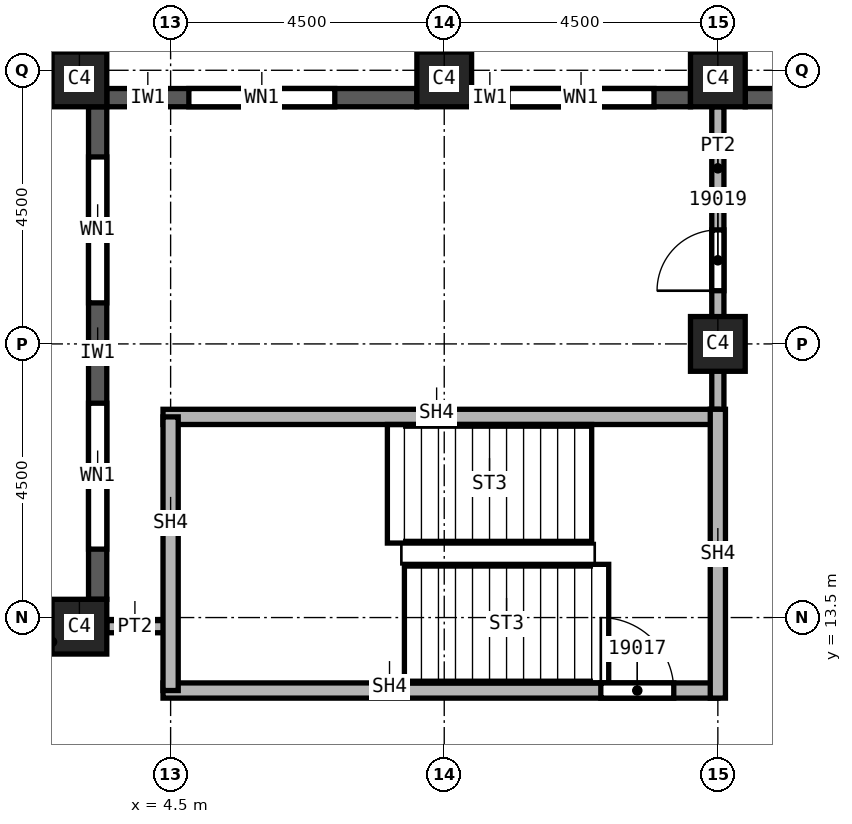
"""IFC4 building model, lengths in metres.
Left out: names, types, materials, properties, quantities, classifications, styles, units other than length and angle.
Written with IfcOpenShell. Run it as: python <this file> out.ifc"""

import sys

from ifc_helpers import new_model, si_unit, direction, frame, frame_2d, origin, origin_2d, place, context, subcontext, project, spatial, rectangle, extrude, element, fill, save


model = new_model("IFC4")
c1 = context("Model", 3, precision=1e-05, world=origin(), true_north=direction((0.0, 1.0)))
c2 = subcontext(c1, "Body", "Model", "MODEL_VIEW")
j1 = project(units=[si_unit("LENGTHUNIT", "METRE"), si_unit("PLANEANGLEUNIT", "RADIAN")], contexts=[c1])
p1 = place(None, origin())
s1 = spatial("IfcSite", under=j1, at=p1, CompositionType="ELEMENT")
p2 = place(p1, origin())
s2 = spatial("IfcBuilding", under=s1, at=p2, CompositionType="ELEMENT")
p3 = place(p2, frame((0.0, 0.0, 278.0)))
s3 = spatial("IfcBuildingStorey", under=s2, at=p3, CompositionType="ELEMENT", Elevation=278.0)
for number, where, z_axis, x_axis in (
    (1, (13.5, 18.0, 0.0), (0.0, 0.0, 1.0), (1.0, 0.0, 0.0)),
    (2, (3.0, 22.35, 0.0), (0.0, 0.0, 1.0), (1.0, 0.0, 0.0)),
    (3, (9.0, 22.35, 0.0), (0.0, 0.0, 1.0), (1.0, 0.0, 0.0)),
    (4, (13.5, 22.35, 0.0), (0.0, 0.0, 1.0), (1.0, 0.0, 0.0)),
    (5, (3.0, 13.35, 0.0), (0.0, 0.0, 1.0), (1.0, 0.0, 0.0)),
):
    element("IfcColumn", number, at=place(p3, frame(where, z_axis=z_axis, x_axis=x_axis)), inside=s3, PredefinedType="COLUMN", context=c2, shape_type="SweptSolid", body=[
        extrude(rectangle(XDim=0.9, YDim=0.9, at=origin_2d()), origin(), (0.0, 0.0, 1.0), 3.72),
    ])
p4 = place(p3, frame((17.55, 22.05, 0.0), z_axis=(0.0, 0.0, 1.0), x_axis=(-1.0, 0.0, 0.0)))
e6 = element("IfcWall", 6, at=p4, inside=s3, PredefinedType="SOLIDWALL", context=c2, shape_type="SweptSolid", body=[
    extrude(rectangle(XDim=3.6, YDim=0.3, at=frame_2d((1.8, 0.0))), origin(), (0.0, 0.0, 1.0), 3.12),
])
p5 = place(p4, frame((0.775, 0.0, 0.8)))
e7 = element("IfcOpeningElement", 7, at=p5, cuts=e6, PredefinedType="OPENING", context=c2, shape_type="SweptSolid", body=[
    extrude(rectangle(XDim=1.0, YDim=1.95, at=frame_2d((0.5, 0.975))), frame((0.0, 0.15, 0.0), z_axis=(0.0, -1.0, 0.0), x_axis=(1.0, 0.0, 0.0)), (0.0, 0.0, 1.0), 0.3),
])
p6 = place(p4, frame((2.375, 0.0, 0.8)))
e8 = element("IfcOpeningElement", 8, at=p6, cuts=e6, PredefinedType="OPENING", context=c2, shape_type="SweptSolid", body=[
    extrude(rectangle(XDim=0.6, YDim=1.95, at=frame_2d((0.3, 0.975))), frame((0.0, 0.15, 0.0), z_axis=(0.0, -1.0, 0.0), x_axis=(1.0, 0.0, 0.0)), (0.0, 0.0, 1.0), 0.3),
])
p7 = place(p3, frame((13.05, 22.05, 0.0), z_axis=(0.0, 0.0, 1.0), x_axis=(-1.0, 0.0, 0.0)))
e9 = element("IfcWall", 9, at=p7, inside=s3, PredefinedType="SOLIDWALL", context=c2, shape_type="SweptSolid", body=[
    extrude(rectangle(XDim=3.6, YDim=0.3, at=frame_2d((1.8, 0.0))), origin(), (0.0, 0.0, 1.0), 3.12),
])
p8 = place(p7, frame((0.6, 0.0, 0.8)))
e10 = element("IfcOpeningElement", 10, at=p8, cuts=e9, PredefinedType="OPENING", context=c2, shape_type="SweptSolid", body=[
    extrude(rectangle(XDim=2.4, YDim=1.95, at=frame_2d((1.2, 0.975))), frame((0.0, 0.15, 0.0), z_axis=(0.0, -1.0, 0.0), x_axis=(1.0, 0.0, 0.0)), (0.0, 0.0, 1.0), 0.3),
])
p9 = place(p3, frame((8.55, 22.05, 0.0), z_axis=(0.0, 0.0, 1.0), x_axis=(-1.0, 0.0, 0.0)))
e11 = element("IfcWall", 11, at=p9, inside=s3, PredefinedType="SOLIDWALL", context=c2, shape_type="SweptSolid", body=[
    extrude(rectangle(XDim=5.1, YDim=0.3, at=frame_2d((2.55, 0.0))), origin(), (0.0, 0.0, 1.0), 3.12),
])
p10 = place(p9, frame((1.35, 0.0, 0.8)))
e12 = element("IfcOpeningElement", 12, at=p10, cuts=e11, PredefinedType="OPENING", context=c2, shape_type="SweptSolid", body=[
    extrude(rectangle(XDim=2.4, YDim=1.95, at=frame_2d((1.2, 0.975))), frame((0.0, 0.15, 0.0), z_axis=(0.0, -1.0, 0.0), x_axis=(1.0, 0.0, 0.0)), (0.0, 0.0, 1.0), 0.3),
])
p11 = place(p3, frame((3.3, 21.9, 0.0), z_axis=(0.0, 0.0, 1.0), x_axis=(0.0, -1.0, 0.0)))
e13 = element("IfcWall", 13, at=p11, inside=s3, PredefinedType="SOLIDWALL", context=c2, shape_type="SweptSolid", body=[
    extrude(rectangle(XDim=8.1, YDim=0.3, at=frame_2d((4.05, 0.0))), origin(), (0.0, 0.0, 1.0), 3.12),
])
p12 = place(p11, frame((0.825, 0.0, 0.8)))
e14 = element("IfcOpeningElement", 14, at=p12, cuts=e13, PredefinedType="OPENING", context=c2, shape_type="SweptSolid", body=[
    extrude(rectangle(XDim=2.4, YDim=1.95, at=frame_2d((1.2, 0.975))), frame((0.0, 0.15, 0.0), z_axis=(0.0, -1.0, 0.0), x_axis=(1.0, 0.0, 0.0)), (0.0, 0.0, 1.0), 0.3),
])
p13 = place(p11, frame((4.875, 0.0, 0.8)))
e15 = element("IfcOpeningElement", 15, at=p13, cuts=e13, PredefinedType="OPENING", context=c2, shape_type="SweptSolid", body=[
    extrude(rectangle(XDim=2.4, YDim=1.95, at=frame_2d((1.2, 0.975))), frame((0.0, 0.15, 0.0), z_axis=(0.0, -1.0, 0.0), x_axis=(1.0, 0.0, 0.0)), (0.0, 0.0, 1.0), 0.3),
])
p14 = place(p3, frame((3.45, 13.35, 0.0), z_axis=(0.0, 0.0, 1.0), x_axis=(1.0, 0.0, 0.0)))
e16 = element("IfcWall", 16, at=p14, inside=s3, PredefinedType="PARTITIONING", context=c2, shape_type="SweptSolid", body=[
    extrude(rectangle(XDim=1.049, YDim=0.2, at=frame_2d((0.524, 0.0))), origin(), (0.0, 0.0, 1.0), 3.72),
])
p15 = place(p3, frame((13.5, 16.675, 0.0), z_axis=(0.0, 0.0, 1.0), x_axis=(0.0, 1.0, 0.0)))
e17 = element("IfcWall", 17, at=p15, inside=s3, PredefinedType="PARTITIONING", context=c2, shape_type="SweptSolid", body=[
    extrude(rectangle(XDim=5.225, YDim=0.2, at=frame_2d((2.612, 0.0))), origin(), (0.0, 0.0, 1.0), 3.72),
])
p16 = place(p15, frame((2.2, 0.0, 0.0)))
e18 = element("IfcOpeningElement", 18, at=p16, cuts=e17, PredefinedType="OPENING", context=c2, shape_type="SweptSolid", body=[
    extrude(rectangle(XDim=1.0, YDim=2.1, at=frame_2d((0.5, 1.05))), frame((0.0, 0.1, 0.0), z_axis=(0.0, -1.0, 0.0), x_axis=(1.0, 0.0, 0.0)), (0.0, 0.0, 1.0), 0.2),
])
p17 = place(p3, frame((4.375, 12.3, 0.0), z_axis=(0.0, 0.0, 1.0), x_axis=(1.0, 0.0, 0.0)))
e19 = element("IfcWall", 19, at=p17, inside=s3, PredefinedType="SOLIDWALL", context=c2, shape_type="SweptSolid", body=[
    extrude(rectangle(XDim=9.125, YDim=0.25, at=frame_2d((4.562, 0.0))), origin(), (0.0, 0.0, 1.0), 3.72),
])
p18 = place(p17, frame((7.2, 0.0, 0.0)))
e20 = element("IfcOpeningElement", 20, at=p18, cuts=e19, PredefinedType="OPENING", context=c2, shape_type="SweptSolid", body=[
    extrude(rectangle(XDim=1.2, YDim=2.1, at=frame_2d((0.6, 1.05))), frame((0.0, 0.125, 0.0), z_axis=(0.0, -1.0, 0.0), x_axis=(1.0, 0.0, 0.0)), (0.0, 0.0, 1.0), 0.25),
])
p19 = place(p3, frame((4.375, 16.8, 0.0), z_axis=(0.0, 0.0, 1.0), x_axis=(1.0, 0.0, 0.0)))
e21 = element("IfcWall", 21, at=p19, inside=s3, PredefinedType="SOLIDWALL", context=c2, shape_type="SweptSolid", body=[
    extrude(rectangle(XDim=9.125, YDim=0.25, at=frame_2d((4.562, 0.0))), origin(), (0.0, 0.0, 1.0), 3.72),
])
p20 = place(p3, frame((4.5, 12.3, 0.0), z_axis=(0.0, 0.0, 1.0), x_axis=(0.0, 1.0, 0.0)))
e22 = element("IfcWall", 22, at=p20, inside=s3, PredefinedType="SOLIDWALL", context=c2, shape_type="SweptSolid", body=[
    extrude(rectangle(XDim=4.5, YDim=0.25, at=frame_2d((2.25, 0.0))), origin(), (0.0, 0.0, 1.0), 3.72),
])
p21 = place(p3, frame((13.5, 12.175, 0.0), z_axis=(0.0, 0.0, 1.0), x_axis=(0.0, 1.0, 0.0)))
e23 = element("IfcWall", 23, at=p21, inside=s3, PredefinedType="SOLIDWALL", context=c2, shape_type="SweptSolid", body=[
    extrude(rectangle(XDim=4.75, YDim=0.25, at=frame_2d((2.375, 0.0))), origin(), (0.0, 0.0, 1.0), 3.72),
])
p22 = place(p8, origin())
e24 = element("IfcWindow", 24, at=p22, inside=s3, PartitioningType="SINGLE_PANEL", PredefinedType="WINDOW", context=c2, shape_type="SweptSolid", body=[
    extrude(rectangle(XDim=2.4, YDim=1.95, at=frame_2d((1.2, 0.975))), frame((0.0, 0.03, 0.0), z_axis=(0.0, -1.0, 0.0), x_axis=(1.0, 0.0, 0.0)), (0.0, 0.0, 1.0), 0.06),
])
fill(e10, e24)
p23 = place(p10, origin())
e25 = element("IfcWindow", 25, at=p23, inside=s3, PartitioningType="SINGLE_PANEL", PredefinedType="WINDOW", context=c2, shape_type="SweptSolid", body=[
    extrude(rectangle(XDim=2.4, YDim=1.95, at=frame_2d((1.2, 0.975))), frame((0.0, 0.03, 0.0), z_axis=(0.0, -1.0, 0.0), x_axis=(1.0, 0.0, 0.0)), (0.0, 0.0, 1.0), 0.06),
])
fill(e12, e25)
p24 = place(p12, origin())
e26 = element("IfcWindow", 26, at=p24, inside=s3, PartitioningType="SINGLE_PANEL", PredefinedType="WINDOW", context=c2, shape_type="SweptSolid", body=[
    extrude(rectangle(XDim=2.4, YDim=1.95, at=frame_2d((1.2, 0.975))), frame((0.0, 0.03, 0.0), z_axis=(0.0, -1.0, 0.0), x_axis=(1.0, 0.0, 0.0)), (0.0, 0.0, 1.0), 0.06),
])
fill(e14, e26)
p25 = place(p13, origin())
e27 = element("IfcWindow", 27, at=p25, inside=s3, PartitioningType="SINGLE_PANEL", PredefinedType="WINDOW", context=c2, shape_type="SweptSolid", body=[
    extrude(rectangle(XDim=2.4, YDim=1.95, at=frame_2d((1.2, 0.975))), frame((0.0, 0.03, 0.0), z_axis=(0.0, -1.0, 0.0), x_axis=(1.0, 0.0, 0.0)), (0.0, 0.0, 1.0), 0.06),
])
fill(e15, e27)
p26 = place(p18, origin())
e28 = element("IfcDoor", 28, at=p26, inside=s3, OperationType="SINGLE_SWING_RIGHT", PredefinedType="DOOR", context=c2, shape_type="SweptSolid", body=[
    extrude(rectangle(XDim=1.2, YDim=2.1, at=frame_2d((0.6, 1.05))), frame((0.0, 0.025, 0.0), z_axis=(0.0, -1.0, 0.0), x_axis=(1.0, 0.0, 0.0)), (0.0, 0.0, 1.0), 0.05),
])
fill(e20, e28)
p27 = place(p16, origin())
e29 = element("IfcDoor", 29, at=p27, inside=s3, OperationType="SINGLE_SWING_RIGHT", PredefinedType="DOOR", context=c2, shape_type="SweptSolid", body=[
    extrude(rectangle(XDim=1.0, YDim=2.1, at=frame_2d((0.5, 1.05))), frame((0.0, 0.025, 0.0), z_axis=(0.0, -1.0, 0.0), x_axis=(1.0, 0.0, 0.0)), (0.0, 0.0, 1.0), 0.05),
])
fill(e18, e29)
save(model, sys.argv[1])
